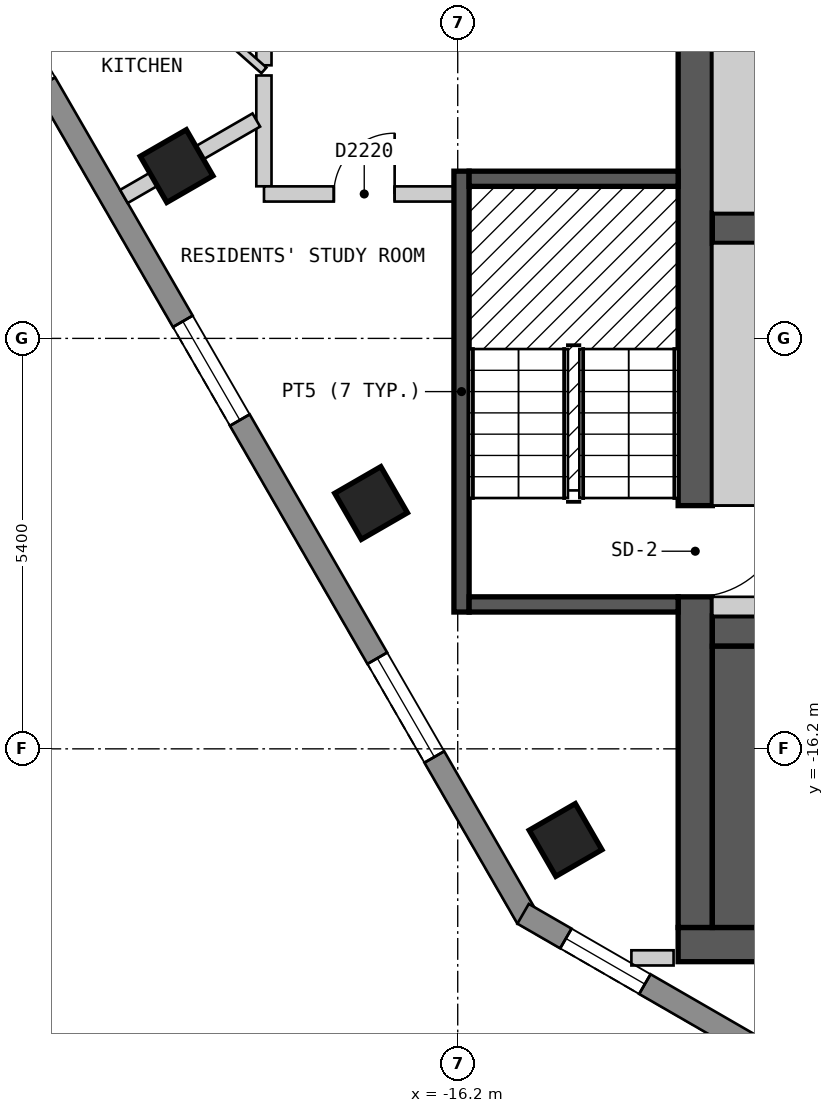
"""IFC4 building model, lengths in metres.
Left out: names, types, materials, properties, quantities, classifications, styles, units other than length and angle.
Written with IfcOpenShell. Run it as: python <this file> out.ifc"""

import sys

from ifc_helpers import new_model, si_unit, direction, frame, frame_2d, origin, origin_2d, place, context, subcontext, project, spatial, polyline, rectangle, outline, extrude, element, fill, save


model = new_model("IFC4")
c1 = context("Model", 3, precision=1e-05, world=origin(), true_north=direction((0.0, 1.0)))
c2 = subcontext(c1, "Body", "Model", "MODEL_VIEW")
j1 = project(units=[si_unit("LENGTHUNIT", "METRE"), si_unit("PLANEANGLEUNIT", "RADIAN")], contexts=[c1])
p1 = place(None, origin())
s1 = spatial("IfcSite", under=j1, at=p1, CompositionType="ELEMENT")
p2 = place(p1, origin())
s2 = spatial("IfcBuilding", under=s1, at=p2, CompositionType="ELEMENT")
p3 = place(p2, frame((0.0, 0.0, 235.8)))
s3 = spatial("IfcBuildingStorey", under=s2, at=p3, CompositionType="ELEMENT", Elevation=235.8)
for number, where, z_axis, x_axis in (
    (1, (-19.899, -8.533, 0.0), (0.0, 0.0, 1.0), (0.5, -0.866, 0.0)),
    (2, (-17.34, -12.966, 0.0), (0.0, 0.0, 1.0), (0.5, -0.866, 0.0)),
    (3, (-14.781, -17.399, 0.0), (0.0, 0.0, 1.0), (0.5, -0.866, 0.0)),
):
    element("IfcColumn", number, at=place(p3, frame(where, z_axis=z_axis, x_axis=x_axis)), inside=s3, PredefinedType="COLUMN", context=c2, shape_type="SweptSolid", body=[
        extrude(rectangle(XDim=0.7, YDim=0.7, at=origin_2d()), origin(), (0.0, 0.0, 1.0), 3.0),
    ])
p4 = place(p3, frame((-13.3, -18.775, 0.0), z_axis=(0.0, 0.0, 1.0), x_axis=(1.0, 0.0, 0.0)))
e4 = element("IfcWall", 4, at=p4, inside=s3, PredefinedType="SHEAR", context=c2, shape_type="SweptSolid", body=[
    extrude(rectangle(XDim=26.6, YDim=0.45, at=frame_2d((13.3, 0.0))), origin(), (0.0, 0.0, 1.0), 2.7),
])
p5 = place(p4, frame((10.25, 0.0, 0.0)))
e5 = element("IfcOpeningElement", 5, at=p5, cuts=e4, PredefinedType="OPENING", context=c2, shape_type="SweptSolid", body=[
    extrude(rectangle(XDim=0.9, YDim=2.1, at=frame_2d((0.45, 1.05))), frame((0.0, 0.235, 0.0), z_axis=(0.0, -1.0, 0.0), x_axis=(1.0, 0.0, 0.0)), (0.0, 0.0, 1.0), 0.47),
])
p6 = place(p3, frame((-13.075, -18.55, 0.0), z_axis=(0.0, 0.0, 1.0), x_axis=(0.0, 1.0, 0.0)))
e6 = element("IfcWall", 6, at=p6, inside=s3, PredefinedType="SHEAR", context=c2, shape_type="SweptSolid", body=[
    extrude(rectangle(XDim=13.1, YDim=0.45, at=frame_2d((6.55, 0.0))), origin(), (0.0, 0.0, 1.0), 2.7),
])
p7 = place(p6, frame((4.35, 0.0, 0.0)))
e7 = element("IfcOpeningElement", 7, at=p7, cuts=e6, PredefinedType="OPENING", context=c2, shape_type="SweptSolid", body=[
    extrude(rectangle(XDim=1.2, YDim=2.1, at=frame_2d((0.6, 1.05))), frame((0.0, 0.235, 0.0), z_axis=(0.0, -1.0, 0.0), x_axis=(1.0, 0.0, 0.0)), (0.0, 0.0, 1.0), 0.47),
])
p8 = place(p3, frame((-12.85, -14.65, 0.0), z_axis=(0.0, 0.0, 1.0), x_axis=(1.0, 0.0, 0.0)))
e8 = element("IfcWall", 8, at=p8, inside=s3, PredefinedType="SHEAR", context=c2, shape_type="SweptSolid", body=[
    extrude(rectangle(XDim=25.7, YDim=0.4, at=frame_2d((12.85, 0.0))), origin(), (0.0, 0.0, 1.0), 2.7),
])
p9 = place(p8, frame((2.05, 0.0, 0.0), z_axis=(0.0, 0.0, 1.0), x_axis=(-1.0, 0.0, 0.0)))
e9 = element("IfcOpeningElement", 9, at=p9, cuts=e8, PredefinedType="OPENING", context=c2, shape_type="SweptSolid", body=[
    extrude(rectangle(XDim=1.2, YDim=2.1, at=frame_2d((0.6, 1.05))), frame((0.0, 0.21, 0.0), z_axis=(0.0, -1.0, 0.0), x_axis=(1.0, 0.0, 0.0)), (0.0, 0.0, 1.0), 0.42),
])
p10 = place(p8, frame((24.9, 0.0, 0.0), z_axis=(0.0, 0.0, 1.0), x_axis=(-1.0, 0.0, 0.0)))
e10 = element("IfcOpeningElement", 10, at=p10, cuts=e8, PredefinedType="OPENING", context=c2, shape_type="SweptSolid", body=[
    extrude(rectangle(XDim=1.2, YDim=2.1, at=frame_2d((0.6, 1.05))), frame((0.0, 0.21, 0.0), z_axis=(0.0, -1.0, 0.0), x_axis=(1.0, 0.0, 0.0)), (0.0, 0.0, 1.0), 0.42),
])
p11 = place(p8, frame((10.0, 0.0, 0.0), z_axis=(0.0, 0.0, 1.0), x_axis=(-1.0, 0.0, 0.0)))
e11 = element("IfcOpeningElement", 11, at=p11, cuts=e8, PredefinedType="OPENING", context=c2, shape_type="SweptSolid", body=[
    extrude(rectangle(XDim=1.0, YDim=2.1, at=frame_2d((0.5, 1.05))), frame((0.0, 0.21, 0.0), z_axis=(0.0, -1.0, 0.0), x_axis=(1.0, 0.0, 0.0)), (0.0, 0.0, 1.0), 0.42),
])
p12 = place(p8, frame((16.4, 0.0, 0.0), z_axis=(0.0, 0.0, 1.0), x_axis=(-1.0, 0.0, 0.0)))
e12 = element("IfcOpeningElement", 12, at=p12, cuts=e8, PredefinedType="OPENING", context=c2, shape_type="SweptSolid", body=[
    extrude(rectangle(XDim=1.0, YDim=2.1, at=frame_2d((0.5, 1.05))), frame((0.0, 0.21, 0.0), z_axis=(0.0, -1.0, 0.0), x_axis=(1.0, 0.0, 0.0)), (0.0, 0.0, 1.0), 0.42),
])
p13 = place(p3, frame((-12.85, -9.35, 0.0), z_axis=(0.0, 0.0, 1.0), x_axis=(1.0, 0.0, 0.0)))
e13 = element("IfcWall", 13, at=p13, inside=s3, PredefinedType="SHEAR", context=c2, shape_type="SweptSolid", body=[
    extrude(rectangle(XDim=23.05, YDim=0.4, at=frame_2d((11.525, 0.0))), origin(), (0.0, 0.0, 1.0), 2.7),
])
p14 = place(p13, frame((1.45, 0.0, 0.0)))
e14 = element("IfcOpeningElement", 14, at=p14, cuts=e13, PredefinedType="OPENING", context=c2, shape_type="SweptSolid", body=[
    extrude(rectangle(XDim=1.1, YDim=2.1, at=frame_2d((0.55, 1.05))), frame((0.0, 0.21, 0.0), z_axis=(0.0, -1.0, 0.0), x_axis=(1.0, 0.0, 0.0)), (0.0, 0.0, 1.0), 0.42),
])
p15 = place(p13, frame((4.25, 0.0, 0.0)))
e15 = element("IfcOpeningElement", 15, at=p15, cuts=e13, PredefinedType="OPENING", context=c2, shape_type="SweptSolid", body=[
    extrude(rectangle(XDim=1.1, YDim=2.1, at=frame_2d((0.55, 1.05))), frame((0.0, 0.21, 0.0), z_axis=(0.0, -1.0, 0.0), x_axis=(1.0, 0.0, 0.0)), (0.0, 0.0, 1.0), 0.42),
])
p16 = place(p13, frame((7.05, 0.0, 0.0)))
e16 = element("IfcOpeningElement", 16, at=p16, cuts=e13, PredefinedType="OPENING", context=c2, shape_type="SweptSolid", body=[
    extrude(rectangle(XDim=1.1, YDim=2.1, at=frame_2d((0.55, 1.05))), frame((0.0, 0.21, 0.0), z_axis=(0.0, -1.0, 0.0), x_axis=(1.0, 0.0, 0.0)), (0.0, 0.0, 1.0), 0.42),
])
p17 = place(p13, frame((9.35, 0.0, 0.0)))
e17 = element("IfcOpeningElement", 17, at=p17, cuts=e13, PredefinedType="OPENING", context=c2, shape_type="SweptSolid", body=[
    extrude(rectangle(XDim=1.1, YDim=2.1, at=frame_2d((0.55, 1.05))), frame((0.0, 0.21, 0.0), z_axis=(0.0, -1.0, 0.0), x_axis=(1.0, 0.0, 0.0)), (0.0, 0.0, 1.0), 0.42),
])
p18 = place(p13, frame((11.65, 0.0, 0.0)))
e18 = element("IfcOpeningElement", 18, at=p18, cuts=e13, PredefinedType="OPENING", context=c2, shape_type="SweptSolid", body=[
    extrude(rectangle(XDim=1.1, YDim=2.1, at=frame_2d((0.55, 1.05))), frame((0.0, 0.21, 0.0), z_axis=(0.0, -1.0, 0.0), x_axis=(1.0, 0.0, 0.0)), (0.0, 0.0, 1.0), 0.42),
])
p19 = place(p13, frame((13.95, 0.0, 0.0)))
e19 = element("IfcOpeningElement", 19, at=p19, cuts=e13, PredefinedType="OPENING", context=c2, shape_type="SweptSolid", body=[
    extrude(rectangle(XDim=1.1, YDim=2.1, at=frame_2d((0.55, 1.05))), frame((0.0, 0.21, 0.0), z_axis=(0.0, -1.0, 0.0), x_axis=(1.0, 0.0, 0.0)), (0.0, 0.0, 1.0), 0.42),
])
p20 = place(p13, frame((16.25, 0.0, 0.0)))
e20 = element("IfcOpeningElement", 20, at=p20, cuts=e13, PredefinedType="OPENING", context=c2, shape_type="SweptSolid", body=[
    extrude(rectangle(XDim=1.1, YDim=2.1, at=frame_2d((0.55, 1.05))), frame((0.0, 0.21, 0.0), z_axis=(0.0, -1.0, 0.0), x_axis=(1.0, 0.0, 0.0)), (0.0, 0.0, 1.0), 0.42),
])
p21 = place(p13, frame((18.55, 0.0, 0.0)))
e21 = element("IfcOpeningElement", 21, at=p21, cuts=e13, PredefinedType="OPENING", context=c2, shape_type="SweptSolid", body=[
    extrude(rectangle(XDim=1.1, YDim=2.1, at=frame_2d((0.55, 1.05))), frame((0.0, 0.21, 0.0), z_axis=(0.0, -1.0, 0.0), x_axis=(1.0, 0.0, 0.0)), (0.0, 0.0, 1.0), 0.42),
])
p22 = place(p13, frame((20.95, 0.0, 0.0)))
e22 = element("IfcOpeningElement", 22, at=p22, cuts=e13, PredefinedType="OPENING", context=c2, shape_type="SweptSolid", body=[
    extrude(rectangle(XDim=1.1, YDim=2.1, at=frame_2d((0.55, 1.05))), frame((0.0, 0.21, 0.0), z_axis=(0.0, -1.0, 0.0), x_axis=(1.0, 0.0, 0.0)), (0.0, 0.0, 1.0), 0.42),
])
p23 = place(p3, frame((-23.599, -4.025, 0.0), z_axis=(0.0, 0.0, 1.0), x_axis=(0.500012653391, -0.866018098222, 0.0)))
e23 = element("IfcWall", 23, at=p23, inside=s3, PredefinedType="SOLIDWALL", context=c2, shape_type="SweptSolid", body=[
    extrude(outline(polyline([(0.0, -0.15), (16.628, -0.15), (16.548, 0.15), (0.08, 0.15), (0.0, -0.15)])), origin(), (0.0, 0.0, 1.0), 2.7),
])
p24 = place(p23, frame((2.444, 0.0, 0.15)))
e24 = element("IfcOpeningElement", 24, at=p24, cuts=e23, PredefinedType="OPENING", context=c2, shape_type="SweptSolid", body=[
    extrude(rectangle(XDim=1.5, YDim=2.1, at=frame_2d((0.75, 1.05))), frame((0.0, 0.16, 0.0), z_axis=(0.0, -1.0, 0.0), x_axis=(1.0, 0.0, 0.0)), (0.0, 0.0, 1.0), 0.32),
])
p25 = place(p23, frame((7.564, 0.0, 0.15)))
e25 = element("IfcOpeningElement", 25, at=p25, cuts=e23, PredefinedType="OPENING", context=c2, shape_type="SweptSolid", body=[
    extrude(rectangle(XDim=1.5, YDim=2.1, at=frame_2d((0.75, 1.05))), frame((0.0, 0.16, 0.0), z_axis=(0.0, -1.0, 0.0), x_axis=(1.0, 0.0, 0.0)), (0.0, 0.0, 1.0), 0.32),
])
p26 = place(p23, frame((12.682, 0.0, 0.15)))
e26 = element("IfcOpeningElement", 26, at=p26, cuts=e23, PredefinedType="OPENING", context=c2, shape_type="SweptSolid", body=[
    extrude(rectangle(XDim=1.5, YDim=2.1, at=frame_2d((0.75, 1.05))), frame((0.0, 0.16, 0.0), z_axis=(0.0, -1.0, 0.0), x_axis=(1.0, 0.0, 0.0)), (0.0, 0.0, 1.0), 0.32),
])
p27 = place(p3, frame((-15.34, -18.37, 0.0), z_axis=(0.0, 0.0, 1.0), x_axis=(0.866022959057, -0.500004234368, 0.0)))
e27 = element("IfcWall", 27, at=p27, inside=s3, PredefinedType="SOLIDWALL", context=c2, shape_type="SweptSolid", body=[
    extrude(outline(polyline([(0.0, -0.15), (5.0, -0.15), (4.92, 0.15), (0.08, 0.15), (0.0, -0.15)])), origin(), (0.0, 0.0, 1.0), 2.7),
])
p28 = place(p27, frame((0.65, 0.0, 0.15)))
e28 = element("IfcOpeningElement", 28, at=p28, cuts=e27, PredefinedType="OPENING", context=c2, shape_type="SweptSolid", body=[
    extrude(rectangle(XDim=1.2, YDim=2.1, at=frame_2d((0.6, 1.05))), frame((0.0, 0.16, 0.0), z_axis=(0.0, -1.0, 0.0), x_axis=(1.0, 0.0, 0.0)), (0.0, 0.0, 1.0), 0.32),
])
p29 = place(p3, frame((-18.75, -7.341, 0.0), z_axis=(0.0, 0.0, 1.0), x_axis=(0.0, -1.0, 0.0)))
e29 = element("IfcWall", 29, at=p29, inside=s3, PredefinedType="PARTITIONING", context=c2, shape_type="SweptSolid", body=[
    extrude(rectangle(XDim=1.458, YDim=0.2, at=frame_2d((0.729, 0.0))), origin(), (0.0, 0.0, 1.0), 2.7),
])
p30 = place(p3, frame((-18.749, -8.9, 0.0), z_axis=(0.0, 0.0, 1.0), x_axis=(1.0, 0.0, 0.0)))
e30 = element("IfcWall", 30, at=p30, inside=s3, PredefinedType="PARTITIONING", context=c2, shape_type="SweptSolid", body=[
    extrude(rectangle(XDim=2.699, YDim=0.2, at=frame_2d((1.35, 0.0))), origin(), (0.0, 0.0, 1.0), 2.7),
])
p31 = place(p30, frame((0.919, 0.0, 0.0)))
e31 = element("IfcOpeningElement", 31, at=p31, cuts=e30, PredefinedType="OPENING", context=c2, shape_type="SweptSolid", body=[
    extrude(rectangle(XDim=0.8, YDim=2.1, at=frame_2d((0.4, 1.05))), frame((0.0, 0.11, 0.0), z_axis=(0.0, -1.0, 0.0), x_axis=(1.0, 0.0, 0.0)), (0.0, 0.0, 1.0), 0.22),
])
p32 = place(p3, frame((-18.75, -7.207, 0.0), z_axis=(0.0, 0.0, 1.0), x_axis=(0.0, 1.0, 0.0)))
e32 = element("IfcWall", 32, at=p32, inside=s3, PredefinedType="PARTITIONING", context=c2, shape_type="SweptSolid", body=[
    extrude(rectangle(XDim=1.106, YDim=0.2, at=frame_2d((0.553, 0.0))), origin(), (0.0, 0.0, 1.0), 2.7),
])
p33 = place(p3, frame((-20.679, -5.565, 0.0), z_axis=(0.0, 0.0, 1.0), x_axis=(0.748495475416, -0.663139897217, 0.0)))
e33 = element("IfcWall", 33, at=p33, inside=s3, PredefinedType="PARTITIONING", context=c2, shape_type="SweptSolid", body=[
    extrude(rectangle(XDim=2.577, YDim=0.1, at=frame_2d((1.289, 0.0))), origin(), (0.0, 0.0, 1.0), 2.7),
])
p34 = place(p3, frame((-13.915, -18.95, 0.0), z_axis=(0.0, 0.0, 1.0), x_axis=(1.0, 0.0, 0.0)))
e34 = element("IfcWall", 34, at=p34, inside=s3, PredefinedType="PARTITIONING", context=c2, shape_type="SweptSolid", body=[
    extrude(rectangle(XDim=0.555, YDim=0.2, at=frame_2d((0.277, 0.0))), origin(), (0.0, 0.0, 1.0), 2.7),
])
p35 = place(p3, frame((-20.592, -8.933, 0.0), z_axis=(0.0, 0.0, 1.0), x_axis=(0.865941000796, 0.500146161777, 0.0)))
e35 = element("IfcWall", 35, at=p35, inside=s3, PredefinedType="PARTITIONING", context=c2, shape_type="SweptSolid", body=[
    extrude(rectangle(XDim=2.012, YDim=0.2, at=frame_2d((1.006, 0.0))), origin(), (0.0, 0.0, 1.0), 2.7),
])
p36 = place(p3, frame((-16.15, -14.4, 0.0), z_axis=(0.0, 0.0, 1.0), x_axis=(0.0, 1.0, 0.0)))
e36 = element("IfcWall", 36, at=p36, inside=s3, PredefinedType="SOLIDWALL", context=c2, shape_type="SweptSolid", body=[
    extrude(rectangle(XDim=5.8, YDim=0.2, at=frame_2d((2.9, 0.0))), origin(), (0.0, 0.0, 1.0), 2.7),
])
for number, where, z_axis, x_axis in (
    (37, (-16.05, -14.3, 0.0), (0.0, 0.0, 1.0), (1.0, 0.0, 0.0)),
    (38, (-16.05, -8.7, 0.0), (0.0, 0.0, 1.0), (1.0, 0.0, 0.0)),
):
    element("IfcWall", number, at=place(p3, frame(where, z_axis=z_axis, x_axis=x_axis)), inside=s3, PredefinedType="SOLIDWALL", context=c2, shape_type="SweptSolid", body=[
        extrude(rectangle(XDim=2.75, YDim=0.2, at=frame_2d((1.375, 0.0))), origin(), (0.0, 0.0, 1.0), 2.7),
    ])
p37 = place(p3, frame((-12.475, -18.55, 0.0), z_axis=(0.0, 0.0, 1.0), x_axis=(0.0, 1.0, 0.0)))
e39 = element("IfcWall", 39, at=p37, inside=s3, PredefinedType="SOLIDWALL", context=c2, shape_type="SweptSolid", body=[
    extrude(rectangle(XDim=3.7, YDim=0.75, at=frame_2d((1.85, 0.0))), origin(), (0.0, 0.0, 1.0), 2.7),
])
p38 = place(p3, frame((-12.85, -14.325, 0.0), z_axis=(0.0, 0.0, 1.0), x_axis=(1.0, 0.0, 0.0)))
e40 = element("IfcWall", 40, at=p38, inside=s3, PredefinedType="PARTITIONING", context=c2, shape_type="SweptSolid", body=[
    extrude(rectangle(XDim=0.75, YDim=0.25, at=frame_2d((0.375, 0.0))), origin(), (0.0, 0.0, 1.0), 2.7),
])
p39 = place(p3, frame((-12.475, -13.0, 0.0), z_axis=(0.0, 0.0, 1.0), x_axis=(0.0, 1.0, 0.0)))
e41 = element("IfcWall", 41, at=p39, inside=s3, PredefinedType="PARTITIONING", context=c2, shape_type="SweptSolid", body=[
    extrude(rectangle(XDim=3.45, YDim=0.75, at=frame_2d((1.725, 0.0))), origin(), (0.0, 0.0, 1.0), 2.7),
])
p40 = place(p3, frame((-12.475, -9.15, 0.0), z_axis=(0.0, 0.0, 1.0), x_axis=(0.0, 1.0, 0.0)))
e42 = element("IfcWall", 42, at=p40, inside=s3, PredefinedType="SOLIDWALL", context=c2, shape_type="SweptSolid", body=[
    extrude(rectangle(XDim=3.7, YDim=0.75, at=frame_2d((1.85, 0.0))), origin(), (0.0, 0.0, 1.0), 2.7),
])
p41 = place(p25, origin())
e43 = element("IfcWindow", 43, at=p41, inside=s3, PartitioningType="SINGLE_PANEL", PredefinedType="WINDOW", context=c2, shape_type="SweptSolid", body=[
    extrude(rectangle(XDim=1.5, YDim=2.1, at=frame_2d((0.75, 1.05))), frame((0.0, 0.03, 0.0), z_axis=(0.0, -1.0, 0.0), x_axis=(1.0, 0.0, 0.0)), (0.0, 0.0, 1.0), 0.06),
])
fill(e25, e43)
p42 = place(p26, origin())
e44 = element("IfcWindow", 44, at=p42, inside=s3, PartitioningType="SINGLE_PANEL", PredefinedType="WINDOW", context=c2, shape_type="SweptSolid", body=[
    extrude(rectangle(XDim=1.5, YDim=2.1, at=frame_2d((0.75, 1.05))), frame((0.0, 0.03, 0.0), z_axis=(0.0, -1.0, 0.0), x_axis=(1.0, 0.0, 0.0)), (0.0, 0.0, 1.0), 0.06),
])
fill(e26, e44)
p43 = place(p28, origin())
e45 = element("IfcWindow", 45, at=p43, inside=s3, PartitioningType="SINGLE_PANEL", PredefinedType="WINDOW", context=c2, shape_type="SweptSolid", body=[
    extrude(rectangle(XDim=1.2, YDim=2.1, at=frame_2d((0.6, 1.05))), frame((0.0, 0.03, 0.0), z_axis=(0.0, -1.0, 0.0), x_axis=(1.0, 0.0, 0.0)), (0.0, 0.0, 1.0), 0.06),
])
fill(e28, e45)
p44 = place(p31, origin())
e46 = element("IfcDoor", 46, at=p44, inside=s3, OperationType="SINGLE_SWING_RIGHT", PredefinedType="DOOR", context=c2, shape_type="SweptSolid", body=[
    extrude(rectangle(XDim=0.8, YDim=2.1, at=frame_2d((0.4, 1.05))), frame((0.0, 0.025, 0.0), z_axis=(0.0, -1.0, 0.0), x_axis=(1.0, 0.0, 0.0)), (0.0, 0.0, 1.0), 0.05),
])
fill(e31, e46)
p45 = place(p7, origin())
e47 = element("IfcDoor", 47, at=p45, inside=s3, OperationType="SINGLE_SWING_RIGHT", PredefinedType="DOOR", context=c2, shape_type="SweptSolid", body=[
    extrude(rectangle(XDim=1.2, YDim=2.1, at=frame_2d((0.6, 1.05))), frame((0.0, 0.025, 0.0), z_axis=(0.0, -1.0, 0.0), x_axis=(1.0, 0.0, 0.0)), (0.0, 0.0, 1.0), 0.05),
])
fill(e7, e47)
save(model, sys.argv[1])
